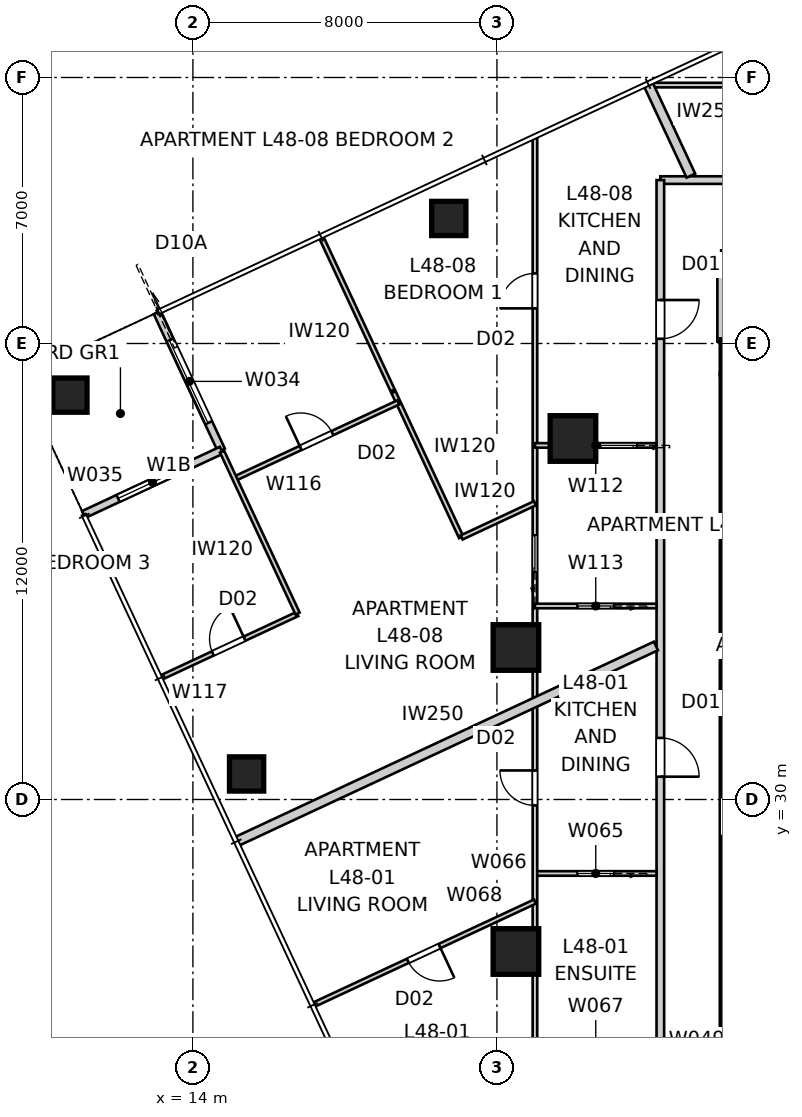
"""IFC4 building model, lengths in metres.
Left out: names, types, materials, properties, quantities, classifications, styles, units other than length and angle.
Written with IfcOpenShell. Run it as: python <this file> out.ifc"""

import sys

from ifc_helpers import new_model, si_unit, direction, frame, frame_2d, origin, origin_2d, place, context, subcontext, project, spatial, polyline, rectangle, outline, extrude, element, fill, save


model = new_model("IFC4")
c1 = context("Model", 3, precision=1e-05, world=origin(), true_north=direction((0.0, 1.0)))
c2 = subcontext(c1, "Body", "Model", "MODEL_VIEW")
j1 = project(units=[si_unit("LENGTHUNIT", "METRE"), si_unit("PLANEANGLEUNIT", "RADIAN")], contexts=[c1])
p1 = place(None, origin())
s1 = spatial("IfcSite", under=j1, at=p1, CompositionType="ELEMENT")
p2 = place(p1, origin())
s2 = spatial("IfcBuilding", under=s1, at=p2, CompositionType="ELEMENT")
p3 = place(p2, frame((0.0, 0.0, 176.0)))
s3 = spatial("IfcBuildingStorey", under=s2, at=p3, CompositionType="ELEMENT", Elevation=176.0)
p4 = place(p3, frame((28.35, 41.2, 0.0), z_axis=(0.0, 0.0, 1.0), x_axis=(0.0, -1.0, 0.0)))
e1 = element("IfcWall", 1, at=p4, inside=s3, PredefinedType="SHEAR", context=c2, shape_type="SweptSolid", body=[
    extrude(outline(polyline([(0.0, -0.45), (22.4, -0.45), (22.4, -0.025), (22.85, -0.025), (22.85, 0.025), (22.4, 0.025), (22.4, 0.45), (0.0, 0.45), (0.0, 0.025), (-0.45, 0.025), (-0.45, -0.025), (0.0, -0.025), (0.0, -0.45)])), origin(), (0.0, 0.0, 1.0), 3.4),
])
p5 = place(p4, frame((11.14, 0.0, 0.0)))
e2 = element("IfcOpeningElement", 2, at=p5, cuts=e1, PredefinedType="OPENING", context=c2, shape_type="SweptSolid", body=[
    extrude(rectangle(XDim=1.02, YDim=2.4, at=frame_2d((0.51, 1.2))), frame((0.0, 0.46, 0.0), z_axis=(0.0, -1.0, 0.0), x_axis=(1.0, 0.0, 0.0)), (0.0, 0.0, 1.0), 0.92),
])
p6 = place(p3, frame((28.35, 41.65, 0.0), z_axis=(0.0, 0.0, 1.0), x_axis=(1.0, 0.0, 0.0)))
e3 = element("IfcColumn", 3, at=p6, inside=s3, PredefinedType="COLUMN", context=c2, shape_type="SweptSolid", body=[
    extrude(rectangle(XDim=0.9, YDim=0.9, at=origin_2d()), origin(), (0.0, 0.0, 1.0), 3.4),
])
for number, where, z_axis, x_axis in (
    (4, (20.733, 45.29, -0.15), (0.0, 0.0, 1.0), (1.0, 0.0, 0.0)),
    (5, (10.764, 40.641, -0.15), (0.0, 0.0, 1.0), (1.0, 0.0, 0.0)),
    (6, (15.412, 30.672, -0.15), (0.0, 0.0, 1.0), (1.0, 0.0, 0.0)),
):
    element("IfcColumn", number, at=place(p3, frame(where, z_axis=z_axis, x_axis=x_axis)), inside=s3, PredefinedType="COLUMN", context=c2, shape_type="SweptSolid", body=[
        extrude(rectangle(XDim=0.9, YDim=0.9, at=origin_2d()), origin(), (0.0, 0.0, 1.0), 3.55),
    ])
for number, where, z_axis, x_axis in (
    (7, (24.0, 39.5, 0.0), (0.0, 0.0, 1.0), (1.0, 0.0, 0.0)),
    (8, (22.5, 34.0, 0.0), (0.0, 0.0, 1.0), (1.0, 0.0, 0.0)),
    (9, (22.5, 26.0, 0.0), (0.0, 0.0, 1.0), (1.0, 0.0, 0.0)),
):
    element("IfcColumn", number, at=place(p3, frame(where, z_axis=z_axis, x_axis=x_axis)), inside=s3, PredefinedType="COLUMN", context=c2, shape_type="SweptSolid", body=[
        extrude(rectangle(XDim=1.2, YDim=1.2, at=origin_2d()), origin(), (0.0, 0.0, 1.0), 3.4),
    ])
p7 = place(p3, frame((13.06, 42.815, 0.0), z_axis=(0.0, 0.0, 1.0), x_axis=(0.422658246362, -0.906289140828, 0.0)))
e10 = element("IfcWall", 10, at=p7, inside=s3, PredefinedType="SOLIDWALL", context=c2, shape_type="SweptSolid", body=[
    extrude(rectangle(XDim=4.0, YDim=0.2, at=frame_2d((2.0, 0.0))), origin(), (0.0, 0.0, 1.0), 3.25),
])
p8 = place(p7, frame((0.8, 0.0, 0.0)))
e11 = element("IfcOpeningElement", 11, at=p8, cuts=e10, PredefinedType="OPENING", context=c2, shape_type="SweptSolid", body=[
    extrude(rectangle(XDim=2.4, YDim=2.1, at=frame_2d((1.2, 1.05))), frame((0.0, 0.11, 0.0), z_axis=(0.0, -1.0, 0.0), x_axis=(1.0, 0.0, 0.0)), (0.0, 0.0, 1.0), 0.22),
])
p9 = place(p3, frame((14.75, 39.19, 0.0), z_axis=(0.0, 0.0, 1.0), x_axis=(-0.906289140828, -0.422658246362, 0.0)))
e12 = element("IfcWall", 12, at=p9, inside=s3, PredefinedType="SOLIDWALL", context=c2, shape_type="SweptSolid", body=[
    extrude(rectangle(XDim=4.0, YDim=0.2, at=frame_2d((2.0, 0.0))), origin(), (0.0, 0.0, 1.0), 3.25),
])
p10 = place(p9, frame((1.0, 0.0, 0.45)))
e13 = element("IfcOpeningElement", 13, at=p10, cuts=e12, PredefinedType="OPENING", context=c2, shape_type="SweptSolid", body=[
    extrude(rectangle(XDim=2.0, YDim=1.8, at=frame_2d((1.0, 0.9))), frame((0.0, 0.11, 0.0), z_axis=(0.0, -1.0, 0.0), x_axis=(1.0, 0.0, 0.0)), (0.0, 0.0, 1.0), 0.22),
])
p11 = place(p3, frame((30.758, 46.3, 0.0), z_axis=(0.0, 0.0, 1.0), x_axis=(-1.0, 0.0, 0.0)))
e14 = element("IfcWall", 14, at=p11, inside=s3, PredefinedType="PARTITIONING", context=c2, shape_type="SweptSolid", body=[
    extrude(rectangle(XDim=4.458, YDim=0.2, at=frame_2d((2.229, 0.0))), origin(), (0.0, 0.0, 1.0), 3.25),
])
p12 = place(p3, frame((26.3, 46.3, 0.0), z_axis=(0.0, 0.0, 1.0), x_axis=(0.0, -1.0, 0.0)))
e15 = element("IfcWall", 15, at=p12, inside=s3, PredefinedType="PARTITIONING", context=c2, shape_type="SweptSolid", body=[
    extrude(rectangle(XDim=32.6, YDim=0.2, at=frame_2d((16.3, 0.0))), origin(), (0.0, 0.0, 1.0), 3.25),
])
p13 = place(p12, frame((3.156, 0.0, 0.0)))
e16 = element("IfcOpeningElement", 16, at=p13, cuts=e15, PredefinedType="OPENING", context=c2, shape_type="SweptSolid", body=[
    extrude(rectangle(XDim=1.02, YDim=2.1, at=frame_2d((0.51, 1.05))), frame((0.0, 0.11, 0.0), z_axis=(0.0, -1.0, 0.0), x_axis=(1.0, 0.0, 0.0)), (0.0, 0.0, 1.0), 0.22),
])
p14 = place(p12, frame((14.68, 0.0, 0.0)))
e17 = element("IfcOpeningElement", 17, at=p14, cuts=e15, PredefinedType="OPENING", context=c2, shape_type="SweptSolid", body=[
    extrude(rectangle(XDim=1.02, YDim=2.34, at=frame_2d((0.51, 1.17))), frame((0.0, 0.11, 0.0), z_axis=(0.0, -1.0, 0.0), x_axis=(1.0, 0.0, 0.0)), (0.0, 0.0, 1.0), 0.22),
])
p15 = place(p12, frame((29.543, 0.0, 0.0)))
e18 = element("IfcOpeningElement", 18, at=p15, cuts=e15, PredefinedType="OPENING", context=c2, shape_type="SweptSolid", body=[
    extrude(rectangle(XDim=1.02, YDim=2.34, at=frame_2d((0.51, 1.17))), frame((0.0, 0.11, 0.0), z_axis=(0.0, -1.0, 0.0), x_axis=(1.0, 0.0, 0.0)), (0.0, 0.0, 1.0), 0.22),
])
p16 = place(p3, frame((25.975, 48.838, 0.0), z_axis=(0.0, 0.0, 1.0), x_axis=(0.422590257842, -0.906320844943, 0.0)))
e19 = element("IfcWall", 19, at=p16, inside=s3, PredefinedType="PARTITIONING", context=c2, shape_type="SweptSolid", body=[
    extrude(rectangle(XDim=2.671, YDim=0.25, at=frame_2d((1.336, 0.0))), origin(), (0.0, 0.0, 1.0), 3.25),
])
p17 = place(p3, frame((15.14, 28.89, 0.0), z_axis=(0.0, 0.0, 1.0), x_axis=(0.906303906082, 0.422626584374, 0.0)))
e20 = element("IfcWall", 20, at=p17, inside=s3, PredefinedType="PARTITIONING", context=c2, shape_type="SweptSolid", body=[
    extrude(rectangle(XDim=12.185, YDim=0.25, at=frame_2d((6.092, 0.0))), origin(), (0.0, 0.0, 1.0), 3.25),
])
p18 = place(p3, frame((52.1, 44.35, 0.0), z_axis=(0.0, 0.0, 1.0), x_axis=(-1.0, 0.0, 0.0)))
e21 = element("IfcWall", 21, at=p18, inside=s3, PredefinedType="PARTITIONING", context=c2, shape_type="SweptSolid", body=[
    extrude(rectangle(XDim=24.2, YDim=0.2, at=frame_2d((12.1, 0.0))), origin(), (0.0, 0.0, 1.0), 3.25),
])
p19 = place(p18, frame((18.789, 0.0, 0.0)))
e22 = element("IfcOpeningElement", 22, at=p19, cuts=e21, PredefinedType="OPENING", context=c2, shape_type="SweptSolid", body=[
    extrude(rectangle(XDim=1.02, YDim=2.1, at=frame_2d((0.51, 1.05))), frame((0.0, 0.11, 0.0), z_axis=(0.0, -1.0, 0.0), x_axis=(1.0, 0.0, 0.0)), (0.0, 0.0, 1.0), 0.22),
])
p20 = place(p18, frame((4.391, 0.0, 0.0)))
e23 = element("IfcOpeningElement", 23, at=p20, cuts=e21, PredefinedType="OPENING", context=c2, shape_type="SweptSolid", body=[
    extrude(rectangle(XDim=1.02, YDim=2.1, at=frame_2d((0.51, 1.05))), frame((0.0, 0.11, 0.0), z_axis=(0.0, -1.0, 0.0), x_axis=(1.0, 0.0, 0.0)), (0.0, 0.0, 1.0), 0.22),
])
p21 = place(p18, frame((11.59, 0.0, 0.0)))
e24 = element("IfcOpeningElement", 24, at=p21, cuts=e21, PredefinedType="OPENING", context=c2, shape_type="SweptSolid", body=[
    extrude(rectangle(XDim=1.02, YDim=2.1, at=frame_2d((0.51, 1.05))), frame((0.0, 0.11, 0.0), z_axis=(0.0, -1.0, 0.0), x_axis=(1.0, 0.0, 0.0)), (0.0, 0.0, 1.0), 0.22),
])
p22 = place(p3, frame((27.9, 44.35, 0.0), z_axis=(0.0, 0.0, 1.0), x_axis=(0.0, -1.0, 0.0)))
e25 = element("IfcWall", 25, at=p22, inside=s3, PredefinedType="PARTITIONING", context=c2, shape_type="SweptSolid", body=[
    extrude(rectangle(XDim=2.3, YDim=0.2, at=frame_2d((1.15, 0.0))), origin(), (0.0, 0.0, 1.0), 3.25),
])
p23 = place(p3, frame((26.2, 28.054, 0.0), z_axis=(0.0, 0.0, 1.0), x_axis=(-1.0, 0.0, 0.0)))
e26 = element("IfcWall", 26, at=p23, inside=s3, PredefinedType="PARTITIONING", context=c2, shape_type="SweptSolid", body=[
    extrude(rectangle(XDim=3.2, YDim=0.12, at=frame_2d((1.6, 0.0))), origin(), (0.0, 0.0, 1.0), 3.25),
])
p24 = place(p23, frame((1.12, 0.0, 0.0)))
e27 = element("IfcOpeningElement", 27, at=p24, cuts=e26, PredefinedType="OPENING", context=c2, shape_type="SweptSolid", body=[
    extrude(rectangle(XDim=0.96, YDim=2.1, at=frame_2d((0.48, 1.05))), frame((0.0, 0.07, 0.0), z_axis=(0.0, -1.0, 0.0), x_axis=(1.0, 0.0, 0.0)), (0.0, 0.0, 1.0), 0.14),
])
p25 = place(p3, frame((23.0, 16.832, 0.0), z_axis=(0.0, 0.0, 1.0), x_axis=(0.0, 1.0, 0.0)))
e28 = element("IfcWall", 28, at=p25, inside=s3, PredefinedType="PARTITIONING", context=c2, shape_type="SweptSolid", body=[
    extrude(rectangle(XDim=30.574, YDim=0.12, at=frame_2d((15.287, 0.0))), origin(), (0.0, 0.0, 1.0), 2.55),
])
p26 = place(p25, frame((26.093, 0.0, 0.0)))
e29 = element("IfcOpeningElement", 29, at=p26, cuts=e28, PredefinedType="OPENING", context=c2, shape_type="SweptSolid", body=[
    extrude(rectangle(XDim=0.92, YDim=2.34, at=frame_2d((0.46, 1.17))), frame((0.0, 0.07, 0.0), z_axis=(0.0, -1.0, 0.0), x_axis=(1.0, 0.0, 0.0)), (0.0, 0.0, 1.0), 0.14),
])
p27 = place(p25, frame((13.012, 0.0, 0.0)))
e30 = element("IfcOpeningElement", 30, at=p27, cuts=e28, PredefinedType="OPENING", context=c2, shape_type="SweptSolid", body=[
    extrude(rectangle(XDim=0.92, YDim=2.34, at=frame_2d((0.46, 1.17))), frame((0.0, 0.07, 0.0), z_axis=(0.0, -1.0, 0.0), x_axis=(1.0, 0.0, 0.0)), (0.0, 0.0, 1.0), 0.14),
])
p28 = place(p25, frame((19.16, 0.0, 0.0)))
e31 = element("IfcOpeningElement", 31, at=p28, cuts=e28, PredefinedType="OPENING", context=c2, shape_type="SweptSolid", body=[
    extrude(rectangle(XDim=0.96, YDim=2.1, at=frame_2d((0.48, 1.05))), frame((0.0, 0.07, 0.0), z_axis=(0.0, -1.0, 0.0), x_axis=(1.0, 0.0, 0.0)), (0.0, 0.0, 1.0), 0.14),
])
p29 = place(p25, frame((2.018, 0.0, 0.0)))
e32 = element("IfcOpeningElement", 32, at=p29, cuts=e28, PredefinedType="OPENING", context=c2, shape_type="SweptSolid", body=[
    extrude(rectangle(XDim=0.96, YDim=2.1, at=frame_2d((0.48, 1.05))), frame((0.0, 0.07, 0.0), z_axis=(0.0, -1.0, 0.0), x_axis=(1.0, 0.0, 0.0)), (0.0, 0.0, 1.0), 0.14),
])
p30 = place(p3, frame((23.0, 27.314, 0.0), z_axis=(0.0, 0.0, 1.0), x_axis=(-0.906305562553, -0.422623032129, 0.0)))
e33 = element("IfcWall", 33, at=p30, inside=s3, PredefinedType="PARTITIONING", context=c2, shape_type="SweptSolid", body=[
    extrude(rectangle(XDim=6.417, YDim=0.12, at=frame_2d((3.209, 0.0))), origin(), (0.0, 0.0, 1.0), 3.25),
])
p31 = place(p30, frame((2.769, 0.0, 0.0)))
e34 = element("IfcOpeningElement", 34, at=p31, cuts=e33, PredefinedType="OPENING", context=c2, shape_type="SweptSolid", body=[
    extrude(rectangle(XDim=0.92, YDim=2.34, at=frame_2d((0.46, 1.17))), frame((0.0, 0.07, 0.0), z_axis=(0.0, -1.0, 0.0), x_axis=(1.0, 0.0, 0.0)), (0.0, 0.0, 1.0), 0.14),
])
p32 = place(p3, frame((25.993, 48.8, 0.0), z_axis=(0.0, 0.0, 1.0), x_axis=(1.0, 0.0, 0.0)))
e35 = element("IfcWall", 35, at=p32, inside=s3, PredefinedType="PARTITIONING", context=c2, shape_type="SweptSolid", body=[
    extrude(rectangle(XDim=20.724, YDim=0.12, at=frame_2d((10.362, 0.0))), origin(), (0.0, 0.0, 1.0), 3.25),
])
p33 = place(p32, frame((7.681, 0.0, 0.0)))
e36 = element("IfcOpeningElement", 36, at=p33, cuts=e35, PredefinedType="OPENING", context=c2, shape_type="SweptSolid", body=[
    extrude(rectangle(XDim=0.92, YDim=2.34, at=frame_2d((0.46, 1.17))), frame((0.0, 0.07, 0.0), z_axis=(0.0, -1.0, 0.0), x_axis=(1.0, 0.0, 0.0)), (0.0, 0.0, 1.0), 0.14),
])
p34 = place(p32, frame((18.766, 0.0, 0.0)))
e37 = element("IfcOpeningElement", 37, at=p34, cuts=e35, PredefinedType="OPENING", context=c2, shape_type="SweptSolid", body=[
    extrude(rectangle(XDim=0.96, YDim=2.1, at=frame_2d((0.48, 1.05))), frame((0.0, 0.07, 0.0), z_axis=(0.0, -1.0, 0.0), x_axis=(1.0, 0.0, 0.0)), (0.0, 0.0, 1.0), 0.14),
])
p35 = place(p32, frame((12.333, 0.0, 0.0)))
e38 = element("IfcOpeningElement", 38, at=p35, cuts=e35, PredefinedType="OPENING", context=c2, shape_type="SweptSolid", body=[
    extrude(rectangle(XDim=0.96, YDim=2.1, at=frame_2d((0.48, 1.05))), frame((0.0, 0.07, 0.0), z_axis=(0.0, -1.0, 0.0), x_axis=(1.0, 0.0, 0.0)), (0.0, 0.0, 1.0), 0.14),
])
p36 = place(p3, frame((26.2, 39.318, 0.0), z_axis=(0.0, 0.0, 1.0), x_axis=(-1.0, 0.0, 0.0)))
e39 = element("IfcWall", 39, at=p36, inside=s3, PredefinedType="PARTITIONING", context=c2, shape_type="SweptSolid", body=[
    extrude(rectangle(XDim=3.2, YDim=0.12, at=frame_2d((1.6, 0.0))), origin(), (0.0, 0.0, 1.0), 3.25),
])
p37 = place(p36, frame((0.52, 0.0, 0.0)))
e40 = element("IfcOpeningElement", 40, at=p37, cuts=e39, PredefinedType="OPENING", context=c2, shape_type="SweptSolid", body=[
    extrude(rectangle(XDim=0.96, YDim=2.1, at=frame_2d((0.48, 1.05))), frame((0.0, 0.07, 0.0), z_axis=(0.0, -1.0, 0.0), x_axis=(1.0, 0.0, 0.0)), (0.0, 0.0, 1.0), 0.14),
])
p38 = place(p3, frame((26.2, 35.092, 0.0), z_axis=(0.0, 0.0, 1.0), x_axis=(-1.0, 0.0, 0.0)))
e41 = element("IfcWall", 41, at=p38, inside=s3, PredefinedType="PARTITIONING", context=c2, shape_type="SweptSolid", body=[
    extrude(rectangle(XDim=3.2, YDim=0.12, at=frame_2d((1.6, 0.0))), origin(), (0.0, 0.0, 1.0), 3.25),
])
p39 = place(p38, frame((1.12, 0.0, 0.0)))
e42 = element("IfcOpeningElement", 42, at=p39, cuts=e41, PredefinedType="OPENING", context=c2, shape_type="SweptSolid", body=[
    extrude(rectangle(XDim=0.96, YDim=2.1, at=frame_2d((0.48, 1.05))), frame((0.0, 0.07, 0.0), z_axis=(0.0, -1.0, 0.0), x_axis=(1.0, 0.0, 0.0)), (0.0, 0.0, 1.0), 0.14),
])
p40 = place(p3, frame((19.279, 40.718, 0.0), z_axis=(0.0, 0.0, 1.0), x_axis=(0.422625167194, -0.906304566939, 0.0)))
e43 = element("IfcWall", 43, at=p40, inside=s3, PredefinedType="PARTITIONING", context=c2, shape_type="SweptSolid", body=[
    extrude(rectangle(XDim=4.211, YDim=0.12, at=frame_2d((2.105, 0.0))), origin(), (0.0, 0.0, 1.0), 3.25),
])
p41 = place(p3, frame((21.072, 36.897, 0.0), z_axis=(0.0, 0.0, 1.0), x_axis=(0.90630329877, 0.422627886727, 0.0)))
e44 = element("IfcWall", 44, at=p41, inside=s3, PredefinedType="PARTITIONING", context=c2, shape_type="SweptSolid", body=[
    extrude(rectangle(XDim=2.128, YDim=0.12, at=frame_2d((1.064, 0.0))), origin(), (0.0, 0.0, 1.0), 3.25),
])
p42 = place(p3, frame((15.099, 38.442, 0.0), z_axis=(0.0, 0.0, 1.0), x_axis=(0.906306539388, 0.422620937321, 0.0)))
e45 = element("IfcWall", 45, at=p42, inside=s3, PredefinedType="PARTITIONING", context=c2, shape_type="SweptSolid", body=[
    extrude(rectangle(XDim=4.75, YDim=0.12, at=frame_2d((2.375, 0.0))), origin(), (0.0, 0.0, 1.0), 3.25),
])
p43 = place(p42, frame((1.915, 0.0, 0.0)))
e46 = element("IfcOpeningElement", 46, at=p43, cuts=e45, PredefinedType="OPENING", context=c2, shape_type="SweptSolid", body=[
    extrude(rectangle(XDim=0.92, YDim=2.34, at=frame_2d((0.46, 1.17))), frame((0.0, 0.07, 0.0), z_axis=(0.0, -1.0, 0.0), x_axis=(1.0, 0.0, 0.0)), (0.0, 0.0, 1.0), 0.14),
])
p44 = place(p3, frame((13.169, 33.211, 0.0), z_axis=(0.0, 0.0, 1.0), x_axis=(0.9062952203, 0.422645210149, 0.0)))
e47 = element("IfcWall", 47, at=p44, inside=s3, PredefinedType="PARTITIONING", context=c2, shape_type="SweptSolid", body=[
    extrude(rectangle(XDim=3.95, YDim=0.12, at=frame_2d((1.975, 0.0))), origin(), (0.0, 0.0, 1.0), 3.25),
])
p45 = place(p44, frame((1.495, 0.0, 0.0)))
e48 = element("IfcOpeningElement", 48, at=p45, cuts=e47, PredefinedType="OPENING", context=c2, shape_type="SweptSolid", body=[
    extrude(rectangle(XDim=0.92, YDim=2.34, at=frame_2d((0.46, 1.17))), frame((0.0, 0.07, 0.0), z_axis=(0.0, -1.0, 0.0), x_axis=(1.0, 0.0, 0.0)), (0.0, 0.0, 1.0), 0.14),
])
p46 = place(p3, frame((16.754, 34.894, 0.0), z_axis=(0.0, 0.0, 1.0), x_axis=(-0.42256979057, 0.906330387937, 0.0)))
e49 = element("IfcWall", 49, at=p46, inside=s3, PredefinedType="PARTITIONING", context=c2, shape_type="SweptSolid", body=[
    extrude(rectangle(XDim=4.7, YDim=0.12, at=frame_2d((2.35, 0.0))), origin(), (0.0, 0.0, 1.0), 3.25),
])
p47 = place(p3, frame((19.256, 40.767, 0.0), z_axis=(0.0, 0.0, 1.0), x_axis=(-0.42260518136, 0.906313886403, 0.0)))
e50 = element("IfcWall", 50, at=p47, inside=s3, PredefinedType="PARTITIONING", context=c2, shape_type="SweptSolid", body=[
    extrude(rectangle(XDim=4.435, YDim=0.12, at=frame_2d((2.218, 0.0))), origin(), (0.0, 0.0, 1.0), 3.25),
])
p48 = place(p8, origin())
e51 = element("IfcDoor", 51, at=p48, inside=s3, OperationType="SLIDING_TO_LEFT", PredefinedType="DOOR", context=c2, shape_type="SweptSolid", body=[
    extrude(rectangle(XDim=2.4, YDim=2.1, at=frame_2d((1.2, 1.05))), frame((0.0, 0.025, 0.0), z_axis=(0.0, -1.0, 0.0), x_axis=(1.0, 0.0, 0.0)), (0.0, 0.0, 1.0), 0.05),
])
fill(e11, e51)
p49 = place(p10, origin())
e52 = element("IfcWindow", 52, at=p49, inside=s3, PartitioningType="SINGLE_PANEL", PredefinedType="WINDOW", context=c2, shape_type="SweptSolid", body=[
    extrude(rectangle(XDim=2.0, YDim=1.8, at=frame_2d((1.0, 0.9))), frame((0.0, 0.03, 0.0), z_axis=(0.0, -1.0, 0.0), x_axis=(1.0, 0.0, 0.0)), (0.0, 0.0, 1.0), 0.06),
])
fill(e13, e52)
p50 = place(p13, origin())
e53 = element("IfcDoor", 53, at=p50, inside=s3, OperationType="SINGLE_SWING_LEFT", PredefinedType="DOOR", context=c2, shape_type="SweptSolid", body=[
    extrude(rectangle(XDim=1.02, YDim=2.1, at=frame_2d((0.51, 1.05))), frame((0.0, 0.025, 0.0), z_axis=(0.0, -1.0, 0.0), x_axis=(1.0, 0.0, 0.0)), (0.0, 0.0, 1.0), 0.05),
])
fill(e16, e53)
p51 = place(p14, origin())
e54 = element("IfcDoor", 54, at=p51, inside=s3, OperationType="SINGLE_SWING_RIGHT", PredefinedType="DOOR", context=c2, shape_type="SweptSolid", body=[
    extrude(rectangle(XDim=1.02, YDim=2.34, at=frame_2d((0.51, 1.17))), frame((0.0, 0.025, 0.0), z_axis=(0.0, -1.0, 0.0), x_axis=(1.0, 0.0, 0.0)), (0.0, 0.0, 1.0), 0.05),
])
fill(e17, e54)
p52 = place(p26, origin())
e55 = element("IfcDoor", 55, at=p52, inside=s3, OperationType="SINGLE_SWING_LEFT", PredefinedType="DOOR", context=c2, shape_type="SweptSolid", body=[
    extrude(rectangle(XDim=0.92, YDim=2.34, at=frame_2d((0.46, 1.17))), frame((0.0, 0.025, 0.0), z_axis=(0.0, -1.0, 0.0), x_axis=(1.0, 0.0, 0.0)), (0.0, 0.0, 1.0), 0.05),
])
fill(e29, e55)
p53 = place(p37, origin())
e56 = element("IfcDoor", 56, at=p53, inside=s3, OperationType="SLIDING_TO_LEFT", PredefinedType="DOOR", context=c2, shape_type="SweptSolid", body=[
    extrude(rectangle(XDim=0.96, YDim=2.1, at=frame_2d((0.48, 1.05))), frame((0.0, 0.025, 0.0), z_axis=(0.0, -1.0, 0.0), x_axis=(1.0, 0.0, 0.0)), (0.0, 0.0, 1.0), 0.05),
])
fill(e40, e56)
p54 = place(p27, origin())
e57 = element("IfcDoor", 57, at=p54, inside=s3, OperationType="SINGLE_SWING_RIGHT", PredefinedType="DOOR", context=c2, shape_type="SweptSolid", body=[
    extrude(rectangle(XDim=0.92, YDim=2.34, at=frame_2d((0.46, 1.17))), frame((0.0, 0.025, 0.0), z_axis=(0.0, -1.0, 0.0), x_axis=(1.0, 0.0, 0.0)), (0.0, 0.0, 1.0), 0.05),
])
fill(e30, e57)
p55 = place(p24, origin())
e58 = element("IfcDoor", 58, at=p55, inside=s3, OperationType="SLIDING_TO_LEFT", PredefinedType="DOOR", context=c2, shape_type="SweptSolid", body=[
    extrude(rectangle(XDim=0.96, YDim=2.1, at=frame_2d((0.48, 1.05))), frame((0.0, 0.025, 0.0), z_axis=(0.0, -1.0, 0.0), x_axis=(1.0, 0.0, 0.0)), (0.0, 0.0, 1.0), 0.05),
])
fill(e27, e58)
p56 = place(p39, origin())
e59 = element("IfcDoor", 59, at=p56, inside=s3, OperationType="SLIDING_TO_LEFT", PredefinedType="DOOR", context=c2, shape_type="SweptSolid", body=[
    extrude(rectangle(XDim=0.96, YDim=2.1, at=frame_2d((0.48, 1.05))), frame((0.0, 0.025, 0.0), z_axis=(0.0, -1.0, 0.0), x_axis=(1.0, 0.0, 0.0)), (0.0, 0.0, 1.0), 0.05),
])
fill(e42, e59)
p57 = place(p28, origin())
e60 = element("IfcDoor", 60, at=p57, inside=s3, OperationType="SLIDING_TO_LEFT", PredefinedType="DOOR", context=c2, shape_type="SweptSolid", body=[
    extrude(rectangle(XDim=0.96, YDim=2.1, at=frame_2d((0.48, 1.05))), frame((0.0, 0.025, 0.0), z_axis=(0.0, -1.0, 0.0), x_axis=(1.0, 0.0, 0.0)), (0.0, 0.0, 1.0), 0.05),
])
fill(e31, e60)
p58 = place(p31, origin())
e61 = element("IfcDoor", 61, at=p58, inside=s3, OperationType="SINGLE_SWING_LEFT", PredefinedType="DOOR", context=c2, shape_type="SweptSolid", body=[
    extrude(rectangle(XDim=0.92, YDim=2.34, at=frame_2d((0.46, 1.17))), frame((0.0, 0.025, 0.0), z_axis=(0.0, -1.0, 0.0), x_axis=(1.0, 0.0, 0.0)), (0.0, 0.0, 1.0), 0.05),
])
fill(e34, e61)
p59 = place(p43, origin())
e62 = element("IfcDoor", 62, at=p59, inside=s3, OperationType="SINGLE_SWING_LEFT", PredefinedType="DOOR", context=c2, shape_type="SweptSolid", body=[
    extrude(rectangle(XDim=0.92, YDim=2.34, at=frame_2d((0.46, 1.17))), frame((0.0, 0.025, 0.0), z_axis=(0.0, -1.0, 0.0), x_axis=(1.0, 0.0, 0.0)), (0.0, 0.0, 1.0), 0.05),
])
fill(e46, e62)
p60 = place(p45, origin())
e63 = element("IfcDoor", 63, at=p60, inside=s3, OperationType="SINGLE_SWING_RIGHT", PredefinedType="DOOR", context=c2, shape_type="SweptSolid", body=[
    extrude(rectangle(XDim=0.92, YDim=2.34, at=frame_2d((0.46, 1.17))), frame((0.0, 0.025, 0.0), z_axis=(0.0, -1.0, 0.0), x_axis=(1.0, 0.0, 0.0)), (0.0, 0.0, 1.0), 0.05),
])
fill(e48, e63)
save(model, sys.argv[1])
